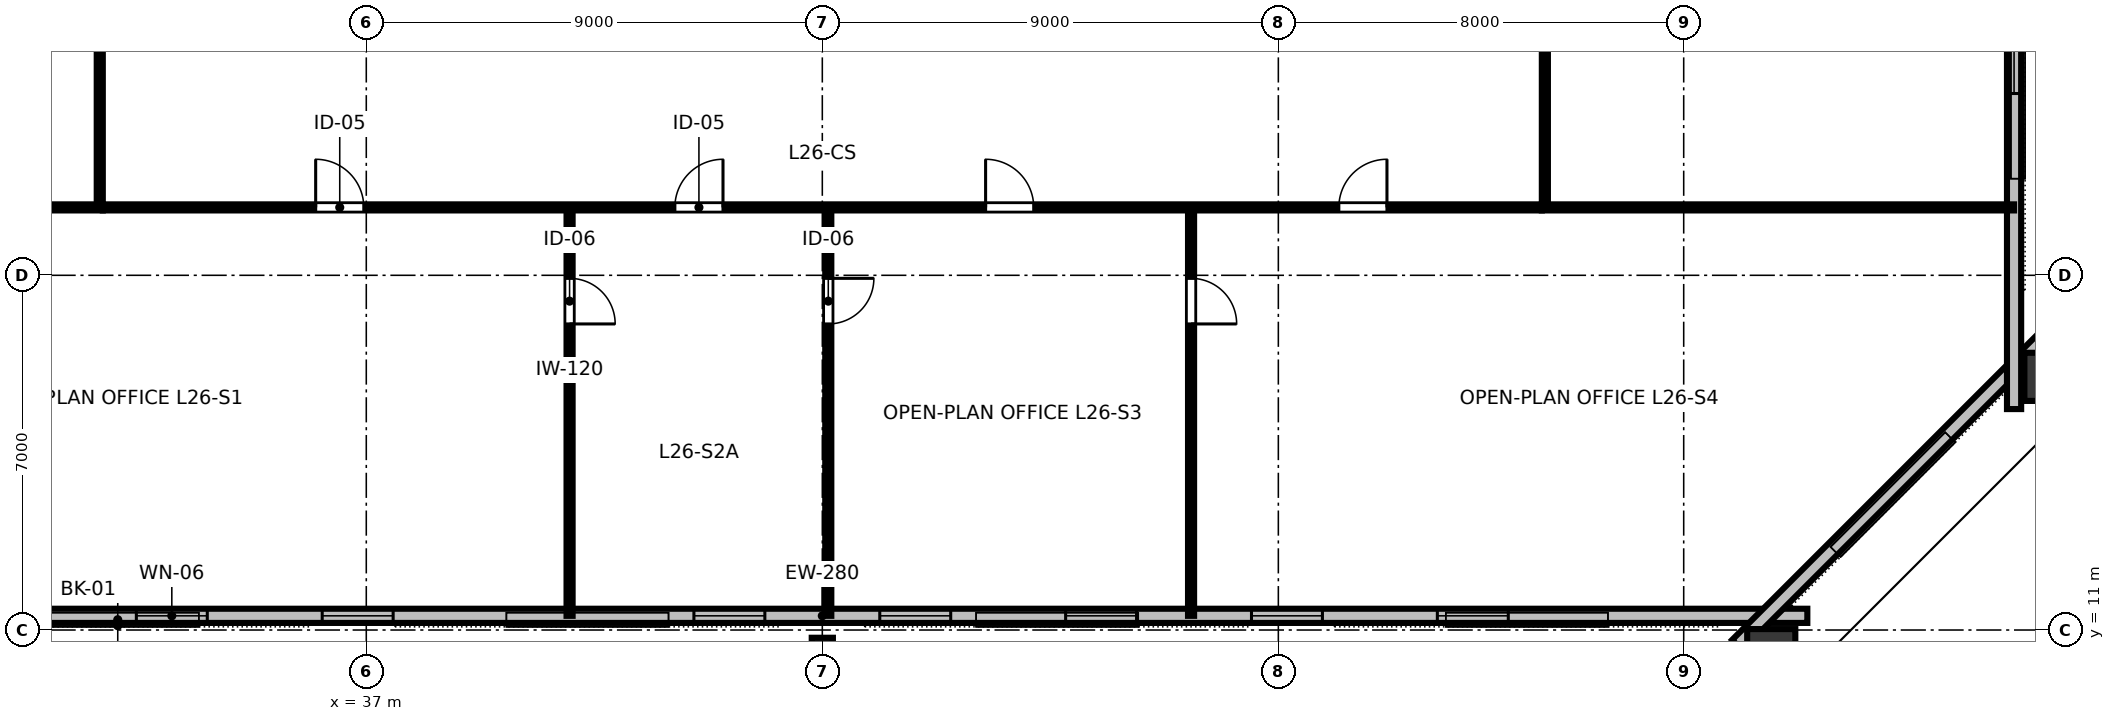
"""IFC4 building model, lengths in metres.
Left out: names, types, materials, properties, quantities, classifications, styles, units other than length and angle.
Written with IfcOpenShell. Run it as: python <this file> out.ifc"""

import sys

from ifc_helpers import new_model, si_unit, direction, frame, frame_2d, origin, origin_2d, place, context, subcontext, project, spatial, rectangle, hollow_rectangle, i_section, extrude, element, fill, save


model = new_model("IFC4")
c1 = context("Model", 3, precision=1e-05, world=origin(), true_north=direction((0.0, 1.0)))
c2 = subcontext(c1, "Body", "Model", "MODEL_VIEW")
j1 = project(units=[si_unit("LENGTHUNIT", "METRE"), si_unit("PLANEANGLEUNIT", "RADIAN")], contexts=[c1])
p1 = place(None, origin())
s1 = spatial("IfcSite", under=j1, at=p1, CompositionType="ELEMENT")
p2 = place(p1, origin())
s2 = spatial("IfcBuilding", under=s1, at=p2, CompositionType="ELEMENT")
p3 = place(p2, frame((0.0, 0.0, 102.4)))
s3 = spatial("IfcBuildingStorey", under=s2, at=p3, CompositionType="ELEMENT", Elevation=102.4)
p4 = place(p3, frame((46.0, 10.62, 0.0), z_axis=(0.0, 0.161571146621, 0.986861066503), x_axis=(-1.0, 0.0, 0.0)))
e1 = element("IfcColumn", 1, at=p4, inside=s3, PredefinedType="COLUMN", context=c2, shape_type="SweptSolid", body=[
    extrude(i_section(OverallWidth=0.418, OverallDepth=0.455, WebThickness=0.042, FlangeThickness=0.068, FilletRadius=0.025, at=origin_2d()), origin(), (0.0, 0.0, 1.0), 3.403),
])
p5 = place(p3, frame((64.728, 10.444, 0.0), z_axis=(-0.227502922189, 0.158490675606, 0.960792967367), x_axis=(-0.571617951621, -0.820519906757, 0.0)))
e2 = element("IfcColumn", 2, at=p5, inside=s3, PredefinedType="COLUMN", context=c2, shape_type="SweptSolid", body=[
    extrude(hollow_rectangle(XDim=0.95, YDim=1.15, WallThickness=0.06, at=origin_2d()), origin(), (0.0, 0.0, 1.0), 3.495),
])
p6 = place(p3, frame((70.299, 15.996, 0.0), z_axis=(-0.187073570433, 0.199172160222, 0.961942789275), x_axis=(0.658567101109, -0.701158543536, 0.273250928932)))
e3 = element("IfcColumn", 3, at=p6, inside=s3, PredefinedType="COLUMN", context=c2, shape_type="SweptSolid", body=[
    extrude(hollow_rectangle(XDim=0.95, YDim=1.15, WallThickness=0.06, at=origin_2d()), origin(), (0.0, 0.0, 1.0), 3.491),
])
p7 = place(p3, frame((26.56, 11.28, 0.0), z_axis=(0.0, 0.0, 1.0), x_axis=(1.0, 0.0, 0.0)))
e4 = element("IfcWall", 4, at=p7, inside=s3, PredefinedType="STANDARD", context=c2, shape_type="SweptSolid", body=[
    extrude(rectangle(XDim=38.88, YDim=0.28, at=frame_2d((19.44, 0.0))), origin(), (0.0, 0.0, 1.0), 2.662),
])
p8 = place(p7, frame((5.902, 0.0, 0.85)))
e5 = element("IfcOpeningElement", 5, at=p8, cuts=e4, PredefinedType="OPENING", context=c2, shape_type="SweptSolid", body=[
    extrude(rectangle(XDim=1.4, YDim=1.2, at=frame_2d((0.7, 0.6))), frame((0.0, 0.15, 0.0), z_axis=(0.0, -1.0, 0.0), x_axis=(1.0, 0.0, 0.0)), (0.0, 0.0, 1.0), 0.3),
])
p9 = place(p7, frame((9.57, 0.0, 0.85)))
e6 = element("IfcOpeningElement", 6, at=p9, cuts=e4, PredefinedType="OPENING", context=c2, shape_type="SweptSolid", body=[
    extrude(rectangle(XDim=1.4, YDim=1.2, at=frame_2d((0.7, 0.6))), frame((0.0, 0.15, 0.0), z_axis=(0.0, -1.0, 0.0), x_axis=(1.0, 0.0, 0.0)), (0.0, 0.0, 1.0), 0.3),
])
p10 = place(p7, frame((16.906, 0.0, 0.85)))
e7 = element("IfcOpeningElement", 7, at=p10, cuts=e4, PredefinedType="OPENING", context=c2, shape_type="SweptSolid", body=[
    extrude(rectangle(XDim=1.4, YDim=1.2, at=frame_2d((0.7, 0.6))), frame((0.0, 0.15, 0.0), z_axis=(0.0, -1.0, 0.0), x_axis=(1.0, 0.0, 0.0)), (0.0, 0.0, 1.0), 0.3),
])
p11 = place(p7, frame((20.574, 0.0, 0.85)))
e8 = element("IfcOpeningElement", 8, at=p11, cuts=e4, PredefinedType="OPENING", context=c2, shape_type="SweptSolid", body=[
    extrude(rectangle(XDim=1.4, YDim=1.2, at=frame_2d((0.7, 0.6))), frame((0.0, 0.15, 0.0), z_axis=(0.0, -1.0, 0.0), x_axis=(1.0, 0.0, 0.0)), (0.0, 0.0, 1.0), 0.3),
])
p12 = place(p7, frame((24.242, 0.0, 0.85)))
e9 = element("IfcOpeningElement", 9, at=p12, cuts=e4, PredefinedType="OPENING", context=c2, shape_type="SweptSolid", body=[
    extrude(rectangle(XDim=1.4, YDim=1.2, at=frame_2d((0.7, 0.6))), frame((0.0, 0.15, 0.0), z_axis=(0.0, -1.0, 0.0), x_axis=(1.0, 0.0, 0.0)), (0.0, 0.0, 1.0), 0.3),
])
p13 = place(p7, frame((27.91, 0.0, 0.85)))
e10 = element("IfcOpeningElement", 10, at=p13, cuts=e4, PredefinedType="OPENING", context=c2, shape_type="SweptSolid", body=[
    extrude(rectangle(XDim=1.4, YDim=1.2, at=frame_2d((0.7, 0.6))), frame((0.0, 0.15, 0.0), z_axis=(0.0, -1.0, 0.0), x_axis=(1.0, 0.0, 0.0)), (0.0, 0.0, 1.0), 0.3),
])
p14 = place(p7, frame((31.578, 0.0, 0.85)))
e11 = element("IfcOpeningElement", 11, at=p14, cuts=e4, PredefinedType="OPENING", context=c2, shape_type="SweptSolid", body=[
    extrude(rectangle(XDim=1.4, YDim=1.2, at=frame_2d((0.7, 0.6))), frame((0.0, 0.15, 0.0), z_axis=(0.0, -1.0, 0.0), x_axis=(1.0, 0.0, 0.0)), (0.0, 0.0, 1.0), 0.3),
])
p15 = place(p3, frame((64.054, 10.706, 0.0), z_axis=(0.0, 0.0, 1.0), x_axis=(0.707106781187, 0.707106781187, 0.0)))
e12 = element("IfcWall", 12, at=p15, inside=s3, PredefinedType="STANDARD", context=c2, shape_type="SweptSolid", body=[
    extrude(rectangle(XDim=8.541, YDim=0.28, at=frame_2d((4.271, 0.0))), origin(), (0.0, 0.0, 1.0), 2.662),
])
p16 = place(p3, frame((69.52, 15.36, 0.0), z_axis=(0.0, 0.0, 1.0), x_axis=(0.0, 1.0, 0.0)))
e13 = element("IfcWall", 13, at=p16, inside=s3, PredefinedType="STANDARD", context=c2, shape_type="SweptSolid", body=[
    extrude(rectangle(XDim=33.28, YDim=0.28, at=frame_2d((16.64, 0.0))), origin(), (0.0, 0.0, 1.0), 2.662),
])
p17 = place(p16, frame((6.228, 0.0, 0.85)))
e14 = element("IfcOpeningElement", 14, at=p17, cuts=e13, PredefinedType="OPENING", context=c2, shape_type="SweptSolid", body=[
    extrude(rectangle(XDim=1.4, YDim=1.2, at=frame_2d((0.7, 0.6))), frame((0.0, 0.15, 0.0), z_axis=(0.0, -1.0, 0.0), x_axis=(1.0, 0.0, 0.0)), (0.0, 0.0, 1.0), 0.3),
])
p18 = place(p16, frame((10.113, 0.0, 0.85)))
e15 = element("IfcOpeningElement", 15, at=p18, cuts=e13, PredefinedType="OPENING", context=c2, shape_type="SweptSolid", body=[
    extrude(rectangle(XDim=1.4, YDim=1.2, at=frame_2d((0.7, 0.6))), frame((0.0, 0.15, 0.0), z_axis=(0.0, -1.0, 0.0), x_axis=(1.0, 0.0, 0.0)), (0.0, 0.0, 1.0), 0.3),
])
p19 = place(p16, frame((13.998, 0.0, 0.85)))
e16 = element("IfcOpeningElement", 16, at=p19, cuts=e13, PredefinedType="OPENING", context=c2, shape_type="SweptSolid", body=[
    extrude(rectangle(XDim=1.4, YDim=1.2, at=frame_2d((0.7, 0.6))), frame((0.0, 0.15, 0.0), z_axis=(0.0, -1.0, 0.0), x_axis=(1.0, 0.0, 0.0)), (0.0, 0.0, 1.0), 0.3),
])
p20 = place(p16, frame((17.883, 0.0, 0.85)))
e17 = element("IfcOpeningElement", 17, at=p20, cuts=e13, PredefinedType="OPENING", context=c2, shape_type="SweptSolid", body=[
    extrude(rectangle(XDim=1.4, YDim=1.2, at=frame_2d((0.7, 0.6))), frame((0.0, 0.15, 0.0), z_axis=(0.0, -1.0, 0.0), x_axis=(1.0, 0.0, 0.0)), (0.0, 0.0, 1.0), 0.3),
])
p21 = place(p16, frame((21.768, 0.0, 0.85)))
e18 = element("IfcOpeningElement", 18, at=p21, cuts=e13, PredefinedType="OPENING", context=c2, shape_type="SweptSolid", body=[
    extrude(rectangle(XDim=1.4, YDim=1.2, at=frame_2d((0.7, 0.6))), frame((0.0, 0.15, 0.0), z_axis=(0.0, -1.0, 0.0), x_axis=(1.0, 0.0, 0.0)), (0.0, 0.0, 1.0), 0.3),
])
p22 = place(p16, frame((25.653, 0.0, 0.85)))
e19 = element("IfcOpeningElement", 19, at=p22, cuts=e13, PredefinedType="OPENING", context=c2, shape_type="SweptSolid", body=[
    extrude(rectangle(XDim=1.4, YDim=1.2, at=frame_2d((0.7, 0.6))), frame((0.0, 0.15, 0.0), z_axis=(0.0, -1.0, 0.0), x_axis=(1.0, 0.0, 0.0)), (0.0, 0.0, 1.0), 0.3),
])
p23 = place(p3, frame((41.012, 19.34, 0.0), z_axis=(0.0, 0.0, 1.0), x_axis=(0.0, -1.0, 0.0)))
e20 = element("IfcWall", 20, at=p23, inside=s3, PredefinedType="PARTITIONING", context=c2, shape_type="SweptSolid", body=[
    extrude(rectangle(XDim=8.06, YDim=0.12, at=frame_2d((4.03, 0.0))), origin(), (0.0, 0.0, 1.0), 2.64),
])
p24 = place(p23, frame((1.4, 0.0, 0.0)))
e21 = element("IfcOpeningElement", 21, at=p24, cuts=e20, PredefinedType="OPENING", context=c2, shape_type="SweptSolid", body=[
    extrude(rectangle(XDim=0.9, YDim=2.15, at=frame_2d((0.45, 1.075))), frame((0.0, 0.07, 0.0), z_axis=(0.0, -1.0, 0.0), x_axis=(1.0, 0.0, 0.0)), (0.0, 0.0, 1.0), 0.14),
])
p25 = place(p3, frame((46.118, 19.34, 0.0), z_axis=(0.0, 0.0, 1.0), x_axis=(0.0, -1.0, 0.0)))
e22 = element("IfcWall", 22, at=p25, inside=s3, PredefinedType="PARTITIONING", context=c2, shape_type="SweptSolid", body=[
    extrude(rectangle(XDim=8.06, YDim=0.12, at=frame_2d((4.03, 0.0))), origin(), (0.0, 0.0, 1.0), 2.64),
])
p26 = place(p25, frame((1.4, 0.0, 0.0)))
e23 = element("IfcOpeningElement", 23, at=p26, cuts=e22, PredefinedType="OPENING", context=c2, shape_type="SweptSolid", body=[
    extrude(rectangle(XDim=0.9, YDim=2.15, at=frame_2d((0.45, 1.075))), frame((0.0, 0.07, 0.0), z_axis=(0.0, -1.0, 0.0), x_axis=(1.0, 0.0, 0.0)), (0.0, 0.0, 1.0), 0.14),
])
p27 = place(p3, frame((53.277, 19.34, 0.0), z_axis=(0.0, 0.0, 1.0), x_axis=(0.0, -1.0, 0.0)))
e24 = element("IfcWall", 24, at=p27, inside=s3, PredefinedType="PARTITIONING", context=c2, shape_type="SweptSolid", body=[
    extrude(rectangle(XDim=8.06, YDim=0.12, at=frame_2d((4.03, 0.0))), origin(), (0.0, 0.0, 1.0), 2.64),
])
p28 = place(p27, frame((1.4, 0.0, 0.0)))
e25 = element("IfcOpeningElement", 25, at=p28, cuts=e24, PredefinedType="OPENING", context=c2, shape_type="SweptSolid", body=[
    extrude(rectangle(XDim=0.9, YDim=2.15, at=frame_2d((0.45, 1.075))), frame((0.0, 0.07, 0.0), z_axis=(0.0, -1.0, 0.0), x_axis=(1.0, 0.0, 0.0)), (0.0, 0.0, 1.0), 0.14),
])
p29 = place(p3, frame((31.8, 19.34, 0.0), z_axis=(0.0, 0.0, 1.0), x_axis=(1.0, 0.0, 0.0)))
e26 = element("IfcWall", 26, at=p29, inside=s3, PredefinedType="PARTITIONING", context=c2, shape_type="SweptSolid", body=[
    extrude(rectangle(XDim=28.4, YDim=0.12, at=frame_2d((14.2, 0.0))), origin(), (0.0, 0.0, 1.0), 2.64),
])
p30 = place(p29, frame((4.201, 0.0, 0.0)))
e27 = element("IfcOpeningElement", 27, at=p30, cuts=e26, PredefinedType="OPENING", context=c2, shape_type="SweptSolid", body=[
    extrude(rectangle(XDim=0.95, YDim=2.15, at=frame_2d((0.475, 1.075))), frame((0.0, 0.07, 0.0), z_axis=(0.0, -1.0, 0.0), x_axis=(1.0, 0.0, 0.0)), (0.0, 0.0, 1.0), 0.14),
])
p31 = place(p29, frame((11.29, 0.0, 0.0)))
e28 = element("IfcOpeningElement", 28, at=p31, cuts=e26, PredefinedType="OPENING", context=c2, shape_type="SweptSolid", body=[
    extrude(rectangle(XDim=0.95, YDim=2.15, at=frame_2d((0.475, 1.075))), frame((0.0, 0.07, 0.0), z_axis=(0.0, -1.0, 0.0), x_axis=(1.0, 0.0, 0.0)), (0.0, 0.0, 1.0), 0.14),
])
p32 = place(p29, frame((17.423, 0.0, 0.0)))
e29 = element("IfcOpeningElement", 29, at=p32, cuts=e26, PredefinedType="OPENING", context=c2, shape_type="SweptSolid", body=[
    extrude(rectangle(XDim=0.95, YDim=2.15, at=frame_2d((0.475, 1.075))), frame((0.0, 0.07, 0.0), z_axis=(0.0, -1.0, 0.0), x_axis=(1.0, 0.0, 0.0)), (0.0, 0.0, 1.0), 0.14),
])
p33 = place(p29, frame((24.394, 0.0, 0.0)))
e30 = element("IfcOpeningElement", 30, at=p33, cuts=e26, PredefinedType="OPENING", context=c2, shape_type="SweptSolid", body=[
    extrude(rectangle(XDim=0.95, YDim=2.15, at=frame_2d((0.475, 1.075))), frame((0.0, 0.07, 0.0), z_axis=(0.0, -1.0, 0.0), x_axis=(1.0, 0.0, 0.0)), (0.0, 0.0, 1.0), 0.14),
])
p34 = place(p3, frame((31.74, 19.4, 0.0), z_axis=(0.0, 0.0, 1.0), x_axis=(0.0, 1.0, 0.0)))
e31 = element("IfcWall", 31, at=p34, inside=s3, PredefinedType="PARTITIONING", context=c2, shape_type="SweptSolid", body=[
    extrude(rectangle(XDim=11.58, YDim=0.12, at=frame_2d((5.79, 0.0))), origin(), (0.0, 0.0, 1.0), 2.64),
])
p35 = place(p34, frame((5.415, 0.0, 0.0)))
e32 = element("IfcOpeningElement", 32, at=p35, cuts=e31, PredefinedType="OPENING", context=c2, shape_type="SweptSolid", body=[
    extrude(rectangle(XDim=0.95, YDim=2.15, at=frame_2d((0.475, 1.075))), frame((0.0, 0.07, 0.0), z_axis=(0.0, -1.0, 0.0), x_axis=(1.0, 0.0, 0.0)), (0.0, 0.0, 1.0), 0.14),
])
p36 = place(p3, frame((60.26, 19.4, 0.0), z_axis=(0.0, 0.0, 1.0), x_axis=(0.0, 1.0, 0.0)))
e33 = element("IfcWall", 33, at=p36, inside=s3, PredefinedType="PARTITIONING", context=c2, shape_type="SweptSolid", body=[
    extrude(rectangle(XDim=11.58, YDim=0.12, at=frame_2d((5.79, 0.0))), origin(), (0.0, 0.0, 1.0), 2.64),
])
p37 = place(p36, frame((5.415, 0.0, 0.0)))
e34 = element("IfcOpeningElement", 34, at=p37, cuts=e33, PredefinedType="OPENING", context=c2, shape_type="SweptSolid", body=[
    extrude(rectangle(XDim=0.95, YDim=2.15, at=frame_2d((0.475, 1.075))), frame((0.0, 0.07, 0.0), z_axis=(0.0, -1.0, 0.0), x_axis=(1.0, 0.0, 0.0)), (0.0, 0.0, 1.0), 0.14),
])
for number, where, z_axis, x_axis in (
    (35, (31.8, 19.34, 0.0), (0.0, 0.0, 1.0), (-1.0, 0.0, 0.0)),
    (36, (60.2, 19.34, 0.0), (0.0, 0.0, 1.0), (1.0, 0.0, 0.0)),
):
    element("IfcWall", number, at=place(p3, frame(where, z_axis=z_axis, x_axis=x_axis)), inside=s3, PredefinedType="PARTITIONING", context=c2, shape_type="SweptSolid", body=[
        extrude(rectangle(XDim=9.32, YDim=0.12, at=frame_2d((4.66, 0.0))), origin(), (0.0, 0.0, 1.0), 2.64),
    ])
p38 = place(p8, origin())
e37 = element("IfcWindow", 37, at=p38, inside=s3, PartitioningType="SINGLE_PANEL", PredefinedType="WINDOW", context=c2, shape_type="SweptSolid", body=[
    extrude(rectangle(XDim=1.4, YDim=1.2, at=frame_2d((0.7, 0.6))), frame((0.0, 0.03, 0.0), z_axis=(0.0, -1.0, 0.0), x_axis=(1.0, 0.0, 0.0)), (0.0, 0.0, 1.0), 0.06),
])
fill(e5, e37)
p39 = place(p9, origin())
e38 = element("IfcWindow", 38, at=p39, inside=s3, PartitioningType="SINGLE_PANEL", PredefinedType="WINDOW", context=c2, shape_type="SweptSolid", body=[
    extrude(rectangle(XDim=1.4, YDim=1.2, at=frame_2d((0.7, 0.6))), frame((0.0, 0.03, 0.0), z_axis=(0.0, -1.0, 0.0), x_axis=(1.0, 0.0, 0.0)), (0.0, 0.0, 1.0), 0.06),
])
fill(e6, e38)
p40 = place(p10, origin())
e39 = element("IfcWindow", 39, at=p40, inside=s3, PartitioningType="SINGLE_PANEL", PredefinedType="WINDOW", context=c2, shape_type="SweptSolid", body=[
    extrude(rectangle(XDim=1.4, YDim=1.2, at=frame_2d((0.7, 0.6))), frame((0.0, 0.03, 0.0), z_axis=(0.0, -1.0, 0.0), x_axis=(1.0, 0.0, 0.0)), (0.0, 0.0, 1.0), 0.06),
])
fill(e7, e39)
p41 = place(p11, origin())
e40 = element("IfcWindow", 40, at=p41, inside=s3, PartitioningType="SINGLE_PANEL", PredefinedType="WINDOW", context=c2, shape_type="SweptSolid", body=[
    extrude(rectangle(XDim=1.4, YDim=1.2, at=frame_2d((0.7, 0.6))), frame((0.0, 0.03, 0.0), z_axis=(0.0, -1.0, 0.0), x_axis=(1.0, 0.0, 0.0)), (0.0, 0.0, 1.0), 0.06),
])
fill(e8, e40)
p42 = place(p12, origin())
e41 = element("IfcWindow", 41, at=p42, inside=s3, PartitioningType="SINGLE_PANEL", PredefinedType="WINDOW", context=c2, shape_type="SweptSolid", body=[
    extrude(rectangle(XDim=1.4, YDim=1.2, at=frame_2d((0.7, 0.6))), frame((0.0, 0.03, 0.0), z_axis=(0.0, -1.0, 0.0), x_axis=(1.0, 0.0, 0.0)), (0.0, 0.0, 1.0), 0.06),
])
fill(e9, e41)
p43 = place(p13, origin())
e42 = element("IfcWindow", 42, at=p43, inside=s3, PartitioningType="SINGLE_PANEL", PredefinedType="WINDOW", context=c2, shape_type="SweptSolid", body=[
    extrude(rectangle(XDim=1.4, YDim=1.2, at=frame_2d((0.7, 0.6))), frame((0.0, 0.03, 0.0), z_axis=(0.0, -1.0, 0.0), x_axis=(1.0, 0.0, 0.0)), (0.0, 0.0, 1.0), 0.06),
])
fill(e10, e42)
p44 = place(p14, origin())
e43 = element("IfcWindow", 43, at=p44, inside=s3, PartitioningType="SINGLE_PANEL", PredefinedType="WINDOW", context=c2, shape_type="SweptSolid", body=[
    extrude(rectangle(XDim=1.4, YDim=1.2, at=frame_2d((0.7, 0.6))), frame((0.0, 0.03, 0.0), z_axis=(0.0, -1.0, 0.0), x_axis=(1.0, 0.0, 0.0)), (0.0, 0.0, 1.0), 0.06),
])
fill(e11, e43)
p45 = place(p17, origin())
e44 = element("IfcWindow", 44, at=p45, inside=s3, PartitioningType="SINGLE_PANEL", PredefinedType="WINDOW", context=c2, shape_type="SweptSolid", body=[
    extrude(rectangle(XDim=1.4, YDim=1.2, at=frame_2d((0.7, 0.6))), frame((0.0, 0.03, 0.0), z_axis=(0.0, -1.0, 0.0), x_axis=(1.0, 0.0, 0.0)), (0.0, 0.0, 1.0), 0.06),
])
fill(e14, e44)
p46 = place(p24, origin())
e45 = element("IfcDoor", 45, at=p46, inside=s3, OperationType="SINGLE_SWING_RIGHT", PredefinedType="DOOR", context=c2, shape_type="SweptSolid", body=[
    extrude(rectangle(XDim=0.9, YDim=2.15, at=frame_2d((0.45, 1.075))), frame((0.0, 0.025, 0.0), z_axis=(0.0, -1.0, 0.0), x_axis=(1.0, 0.0, 0.0)), (0.0, 0.0, 1.0), 0.05),
])
fill(e21, e45)
p47 = place(p26, origin())
e46 = element("IfcDoor", 46, at=p47, inside=s3, OperationType="SINGLE_SWING_LEFT", PredefinedType="DOOR", context=c2, shape_type="SweptSolid", body=[
    extrude(rectangle(XDim=0.9, YDim=2.15, at=frame_2d((0.45, 1.075))), frame((0.0, 0.025, 0.0), z_axis=(0.0, -1.0, 0.0), x_axis=(1.0, 0.0, 0.0)), (0.0, 0.0, 1.0), 0.05),
])
fill(e23, e46)
p48 = place(p28, origin())
e47 = element("IfcDoor", 47, at=p48, inside=s3, OperationType="SINGLE_SWING_RIGHT", PredefinedType="DOOR", context=c2, shape_type="SweptSolid", body=[
    extrude(rectangle(XDim=0.9, YDim=2.15, at=frame_2d((0.45, 1.075))), frame((0.0, 0.025, 0.0), z_axis=(0.0, -1.0, 0.0), x_axis=(1.0, 0.0, 0.0)), (0.0, 0.0, 1.0), 0.05),
])
fill(e25, e47)
p49 = place(p30, origin())
e48 = element("IfcDoor", 48, at=p49, inside=s3, OperationType="SINGLE_SWING_LEFT", PredefinedType="DOOR", context=c2, shape_type="SweptSolid", body=[
    extrude(rectangle(XDim=0.95, YDim=2.15, at=frame_2d((0.475, 1.075))), frame((0.0, 0.025, 0.0), z_axis=(0.0, -1.0, 0.0), x_axis=(1.0, 0.0, 0.0)), (0.0, 0.0, 1.0), 0.05),
])
fill(e27, e48)
p50 = place(p31, origin())
e49 = element("IfcDoor", 49, at=p50, inside=s3, OperationType="SINGLE_SWING_RIGHT", PredefinedType="DOOR", context=c2, shape_type="SweptSolid", body=[
    extrude(rectangle(XDim=0.95, YDim=2.15, at=frame_2d((0.475, 1.075))), frame((0.0, 0.025, 0.0), z_axis=(0.0, -1.0, 0.0), x_axis=(1.0, 0.0, 0.0)), (0.0, 0.0, 1.0), 0.05),
])
fill(e28, e49)
p51 = place(p32, origin())
e50 = element("IfcDoor", 50, at=p51, inside=s3, OperationType="SINGLE_SWING_LEFT", PredefinedType="DOOR", context=c2, shape_type="SweptSolid", body=[
    extrude(rectangle(XDim=0.95, YDim=2.15, at=frame_2d((0.475, 1.075))), frame((0.0, 0.025, 0.0), z_axis=(0.0, -1.0, 0.0), x_axis=(1.0, 0.0, 0.0)), (0.0, 0.0, 1.0), 0.05),
])
fill(e29, e50)
p52 = place(p33, origin())
e51 = element("IfcDoor", 51, at=p52, inside=s3, OperationType="SINGLE_SWING_RIGHT", PredefinedType="DOOR", context=c2, shape_type="SweptSolid", body=[
    extrude(rectangle(XDim=0.95, YDim=2.15, at=frame_2d((0.475, 1.075))), frame((0.0, 0.025, 0.0), z_axis=(0.0, -1.0, 0.0), x_axis=(1.0, 0.0, 0.0)), (0.0, 0.0, 1.0), 0.05),
])
fill(e30, e51)
save(model, sys.argv[1])
